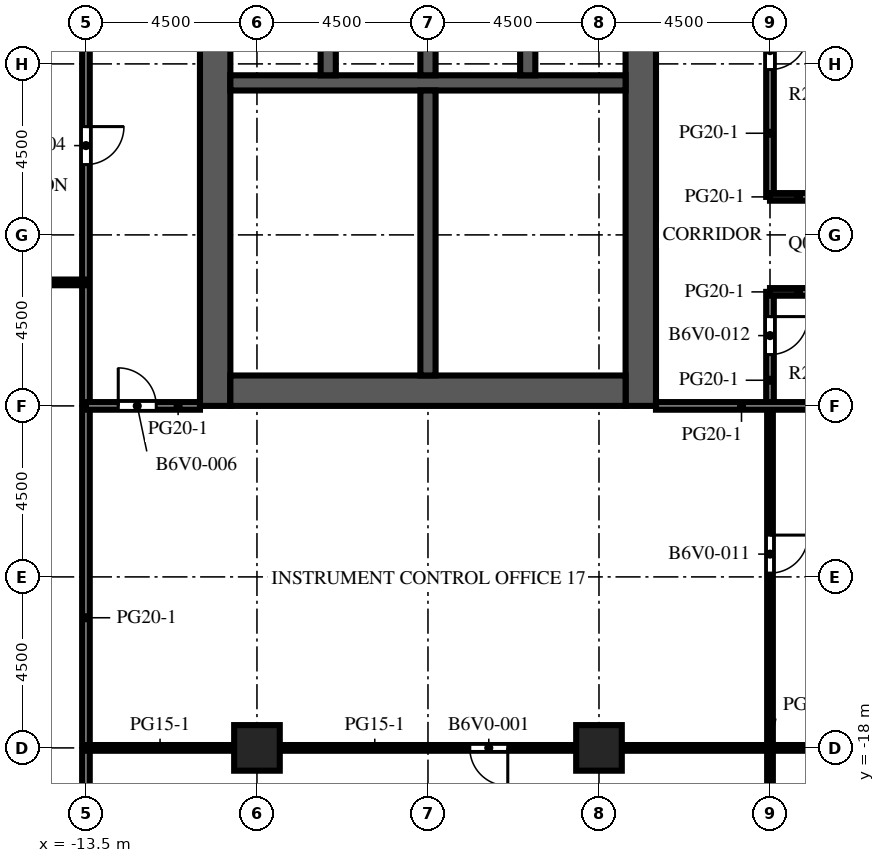
"""IFC4 building model, lengths in metres.
Left out: names, types, materials, properties, quantities, classifications, styles, units other than length and angle.
Written with IfcOpenShell. Run it as: python <this file> out.ifc"""

import sys

from ifc_helpers import new_model, si_unit, direction, frame, frame_2d, origin, origin_2d, place, context, subcontext, project, spatial, rectangle, extrude, element, fill, save


model = new_model("IFC4")
c1 = context("Model", 3, precision=1e-05, world=origin(), true_north=direction((0.0, 1.0)))
c2 = subcontext(c1, "Body", "Model", "MODEL_VIEW")
j1 = project(units=[si_unit("LENGTHUNIT", "METRE"), si_unit("PLANEANGLEUNIT", "RADIAN")], contexts=[c1])
p1 = place(None, origin())
s1 = spatial("IfcSite", under=j1, at=p1, CompositionType="ELEMENT")
p2 = place(p1, origin())
s2 = spatial("IfcBuilding", under=s1, at=p2, CompositionType="ELEMENT")
p3 = place(p2, frame((0.0, 0.0, 199.7)))
s3 = spatial("IfcBuildingStorey", under=s2, at=p3, CompositionType="ELEMENT", Elevation=199.7)
for number, where, z_axis, x_axis in (
    (1, (-9.0, -18.0, 0.0), (0.0, 0.0, 1.0), (1.0, 0.0, 0.0)),
    (2, (0.0, -18.0, 0.0), (0.0, 0.0, 1.0), (1.0, 0.0, 0.0)),
):
    element("IfcColumn", number, at=place(p3, frame(where, z_axis=z_axis, x_axis=x_axis)), inside=s3, PredefinedType="COLUMN", context=c2, shape_type="SweptSolid", body=[
        extrude(rectangle(XDim=1.2, YDim=1.2, at=origin_2d()), origin(), (0.0, 0.0, 1.0), 4.1),
    ])
p4 = place(p3, frame((-10.1, -9.0, 0.0), z_axis=(0.0, 0.0, 1.0), x_axis=(0.0, 1.0, 0.0)))
e3 = element("IfcWall", 3, at=p4, inside=s3, PredefinedType="SHEAR", context=c2, shape_type="SweptSolid", body=[
    extrude(rectangle(XDim=27.5, YDim=0.8, at=frame_2d((13.75, 0.0))), origin(), (0.0, 0.0, 1.0), 4.1),
])
p5 = place(p4, frame((12.55, 0.0, 0.0)))
e4 = element("IfcOpeningElement", 4, at=p5, cuts=e3, PredefinedType="OPENING", context=c2, shape_type="SweptSolid", body=[
    extrude(rectangle(XDim=2.4, YDim=2.4, at=frame_2d((1.2, 1.2))), frame((0.0, 0.41, 0.0), z_axis=(0.0, -1.0, 0.0), x_axis=(1.0, 0.0, 0.0)), (0.0, 0.0, 1.0), 0.82),
])
p6 = place(p4, frame((6.825, 0.0, 0.0)))
e5 = element("IfcOpeningElement", 5, at=p6, cuts=e3, PredefinedType="OPENING", context=c2, shape_type="SweptSolid", body=[
    extrude(rectangle(XDim=1.2, YDim=2.1, at=frame_2d((0.6, 1.05))), frame((0.0, 0.41, 0.0), z_axis=(0.0, -1.0, 0.0), x_axis=(1.0, 0.0, 0.0)), (0.0, 0.0, 1.0), 0.82),
])
p7 = place(p4, frame((19.475, 0.0, 0.0)))
e6 = element("IfcOpeningElement", 6, at=p7, cuts=e3, PredefinedType="OPENING", context=c2, shape_type="SweptSolid", body=[
    extrude(rectangle(XDim=1.2, YDim=2.1, at=frame_2d((0.6, 1.05))), frame((0.0, 0.41, 0.0), z_axis=(0.0, -1.0, 0.0), x_axis=(1.0, 0.0, 0.0)), (0.0, 0.0, 1.0), 0.82),
])
p8 = place(p3, frame((1.1, -9.0, 0.0), z_axis=(0.0, 0.0, 1.0), x_axis=(0.0, 1.0, 0.0)))
e7 = element("IfcWall", 7, at=p8, inside=s3, PredefinedType="SHEAR", context=c2, shape_type="SweptSolid", body=[
    extrude(rectangle(XDim=27.5, YDim=0.8, at=frame_2d((13.75, 0.0))), origin(), (0.0, 0.0, 1.0), 4.1),
])
p9 = place(p8, frame((12.55, 0.0, 0.0)))
e8 = element("IfcOpeningElement", 8, at=p9, cuts=e7, PredefinedType="OPENING", context=c2, shape_type="SweptSolid", body=[
    extrude(rectangle(XDim=2.4, YDim=2.4, at=frame_2d((1.2, 1.2))), frame((0.0, 0.41, 0.0), z_axis=(0.0, -1.0, 0.0), x_axis=(1.0, 0.0, 0.0)), (0.0, 0.0, 1.0), 0.82),
])
p10 = place(p8, frame((3.95, 0.0, 0.0)))
e9 = element("IfcOpeningElement", 9, at=p10, cuts=e7, PredefinedType="OPENING", context=c2, shape_type="SweptSolid", body=[
    extrude(rectangle(XDim=1.2, YDim=2.1, at=frame_2d((0.6, 1.05))), frame((0.0, 0.41, 0.0), z_axis=(0.0, -1.0, 0.0), x_axis=(1.0, 0.0, 0.0)), (0.0, 0.0, 1.0), 0.82),
])
p11 = place(p8, frame((19.45, 0.0, 0.0)))
e10 = element("IfcOpeningElement", 10, at=p11, cuts=e7, PredefinedType="OPENING", context=c2, shape_type="SweptSolid", body=[
    extrude(rectangle(XDim=1.0, YDim=2.1, at=frame_2d((0.5, 1.05))), frame((0.0, 0.41, 0.0), z_axis=(0.0, -1.0, 0.0), x_axis=(1.0, 0.0, 0.0)), (0.0, 0.0, 1.0), 0.82),
])
p12 = place(p8, frame((21.137, 0.0, 0.0)))
e11 = element("IfcOpeningElement", 11, at=p12, cuts=e7, PredefinedType="OPENING", context=c2, shape_type="SweptSolid", body=[
    extrude(rectangle(XDim=1.0, YDim=2.1, at=frame_2d((0.5, 1.05))), frame((0.0, 0.41, 0.0), z_axis=(0.0, -1.0, 0.0), x_axis=(1.0, 0.0, 0.0)), (0.0, 0.0, 1.0), 0.82),
])
p13 = place(p8, frame((23.2, 0.0, 0.0)))
e12 = element("IfcOpeningElement", 12, at=p13, cuts=e7, PredefinedType="OPENING", context=c2, shape_type="SweptSolid", body=[
    extrude(rectangle(XDim=1.0, YDim=2.1, at=frame_2d((0.5, 1.05))), frame((0.0, 0.41, 0.0), z_axis=(0.0, -1.0, 0.0), x_axis=(1.0, 0.0, 0.0)), (0.0, 0.0, 1.0), 0.82),
])
p14 = place(p8, frame((25.262, 0.0, 0.0)))
e13 = element("IfcOpeningElement", 13, at=p14, cuts=e7, PredefinedType="OPENING", context=c2, shape_type="SweptSolid", body=[
    extrude(rectangle(XDim=1.0, YDim=2.1, at=frame_2d((0.5, 1.05))), frame((0.0, 0.41, 0.0), z_axis=(0.0, -1.0, 0.0), x_axis=(1.0, 0.0, 0.0)), (0.0, 0.0, 1.0), 0.82),
])
p15 = place(p3, frame((-9.7, -8.6, 0.0), z_axis=(0.0, 0.0, 1.0), x_axis=(1.0, 0.0, 0.0)))
e14 = element("IfcWall", 14, at=p15, inside=s3, PredefinedType="SHEAR", context=c2, shape_type="SweptSolid", body=[
    extrude(rectangle(XDim=10.4, YDim=0.8, at=frame_2d((5.2, 0.0))), origin(), (0.0, 0.0, 1.0), 4.1),
])
p16 = place(p3, frame((-9.7, -0.5, 0.0), z_axis=(0.0, 0.0, 1.0), x_axis=(1.0, 0.0, 0.0)))
e15 = element("IfcWall", 15, at=p16, inside=s3, PredefinedType="SHEAR", context=c2, shape_type="SweptSolid", body=[
    extrude(rectangle(XDim=10.4, YDim=0.4, at=frame_2d((5.2, 0.0))), origin(), (0.0, 0.0, 1.0), 4.1),
])
for number, where, z_axis, x_axis in (
    (16, (-7.125, -0.3, 0.0), (0.0, 0.0, 1.0), (0.0, 1.0, 0.0)),
    (17, (-4.5, -0.3, 0.0), (0.0, 0.0, 1.0), (0.0, 1.0, 0.0)),
    (18, (-1.875, -0.3, 0.0), (0.0, 0.0, 1.0), (0.0, 1.0, 0.0)),
):
    element("IfcWall", number, at=place(p3, frame(where, z_axis=z_axis, x_axis=x_axis)), inside=s3, PredefinedType="SHEAR", context=c2, shape_type="SweptSolid", body=[
        extrude(rectangle(XDim=2.9, YDim=0.4, at=frame_2d((1.45, 0.0))), origin(), (0.0, 0.0, 1.0), 4.1),
    ])
p17 = place(p3, frame((-4.5, -8.2, 0.0), z_axis=(0.0, 0.0, 1.0), x_axis=(0.0, 1.0, 0.0)))
e19 = element("IfcWall", 19, at=p17, inside=s3, PredefinedType="SHEAR", context=c2, shape_type="SweptSolid", body=[
    extrude(rectangle(XDim=7.5, YDim=0.4, at=frame_2d((3.75, 0.0))), origin(), (0.0, 0.0, 1.0), 4.1),
])
p18 = place(p3, frame((-0.9, -5.95, 0.0), z_axis=(0.0, 0.0, 1.0), x_axis=(1.0, 0.0, 0.0)))
e20 = element("IfcWall", 20, at=p18, inside=s3, PredefinedType="PARTITIONING", context=c2, shape_type="SweptSolid", body=[
    extrude(rectangle(XDim=1.6, YDim=0.1, at=frame_2d((0.8, 0.0))), origin(), (0.0, 0.0, 1.0), 3.65),
])
p19 = place(p18, frame((0.3, 0.0, 0.0)))
e21 = element("IfcOpeningElement", 21, at=p19, cuts=e20, PredefinedType="OPENING", context=c2, shape_type="SweptSolid", body=[
    extrude(rectangle(XDim=1.0, YDim=2.1, at=frame_2d((0.5, 1.05))), frame((0.0, 0.06, 0.0), z_axis=(0.0, -1.0, 0.0), x_axis=(1.0, 0.0, 0.0)), (0.0, 0.0, 1.0), 0.12),
])
p20 = place(p3, frame((-0.9, -2.95, 0.0), z_axis=(0.0, 0.0, 1.0), x_axis=(1.0, 0.0, 0.0)))
e22 = element("IfcWall", 22, at=p20, inside=s3, PredefinedType="PARTITIONING", context=c2, shape_type="SweptSolid", body=[
    extrude(rectangle(XDim=1.6, YDim=0.1, at=frame_2d((0.8, 0.0))), origin(), (0.0, 0.0, 1.0), 3.65),
])
p21 = place(p20, frame((0.3, 0.0, 0.0)))
e23 = element("IfcOpeningElement", 23, at=p21, cuts=e22, PredefinedType="OPENING", context=c2, shape_type="SweptSolid", body=[
    extrude(rectangle(XDim=1.0, YDim=2.1, at=frame_2d((0.5, 1.05))), frame((0.0, 0.06, 0.0), z_axis=(0.0, -1.0, 0.0), x_axis=(1.0, 0.0, 0.0)), (0.0, 0.0, 1.0), 0.12),
])
p22 = place(p3, frame((-0.9, -5.95, 0.0), z_axis=(0.0, 0.0, 1.0), x_axis=(0.0, 1.0, 0.0)))
e24 = element("IfcWall", 24, at=p22, inside=s3, PredefinedType="PARTITIONING", context=c2, shape_type="SweptSolid", body=[
    extrude(rectangle(XDim=3.0, YDim=0.1, at=frame_2d((1.5, 0.0))), origin(), (0.0, 0.0, 1.0), 3.65),
])
p23 = place(p22, frame((1.0, 0.0, 0.0)))
e25 = element("IfcOpeningElement", 25, at=p23, cuts=e24, PredefinedType="OPENING", context=c2, shape_type="SweptSolid", body=[
    extrude(rectangle(XDim=1.0, YDim=2.1, at=frame_2d((0.5, 1.05))), frame((0.0, 0.06, 0.0), z_axis=(0.0, -1.0, 0.0), x_axis=(1.0, 0.0, 0.0)), (0.0, 0.0, 1.0), 0.12),
])
for number, where, z_axis, x_axis in (
    (26, (-4.3, -5.95, 0.0), (0.0, 0.0, 1.0), (1.0, 0.0, 0.0)),
    (27, (-4.3, -2.95, 0.0), (0.0, 0.0, 1.0), (1.0, 0.0, 0.0)),
):
    element("IfcWall", number, at=place(p3, frame(where, z_axis=z_axis, x_axis=x_axis)), inside=s3, PredefinedType="PARTITIONING", context=c2, shape_type="SweptSolid", body=[
        extrude(rectangle(XDim=3.4, YDim=0.1, at=frame_2d((1.7, 0.0))), origin(), (0.0, 0.0, 1.0), 3.65),
    ])
p24 = place(p3, frame((-13.5, -26.5, 0.0), z_axis=(0.0, 0.0, 1.0), x_axis=(0.0, 1.0, 0.0)))
e28 = element("IfcWall", 28, at=p24, inside=s3, PredefinedType="PARTITIONING", context=c2, shape_type="SweptSolid", body=[
    extrude(rectangle(XDim=29.75, YDim=0.2, at=frame_2d((14.875, 0.0))), origin(), (0.0, 0.0, 1.0), 3.65),
])
p25 = place(p24, frame((23.85, 0.0, 0.0)))
e29 = element("IfcOpeningElement", 29, at=p25, cuts=e28, PredefinedType="OPENING", context=c2, shape_type="SweptSolid", body=[
    extrude(rectangle(XDim=1.0, YDim=2.1, at=frame_2d((0.5, 1.05))), frame((0.0, 0.11, 0.0), z_axis=(0.0, -1.0, 0.0), x_axis=(1.0, 0.0, 0.0)), (0.0, 0.0, 1.0), 0.22),
])
p26 = place(p3, frame((4.5, -9.0, 0.0), z_axis=(0.0, 0.0, 1.0), x_axis=(0.0, -1.0, 0.0)))
e30 = element("IfcWall", 30, at=p26, inside=s3, PredefinedType="PARTITIONING", context=c2, shape_type="SweptSolid", body=[
    extrude(rectangle(XDim=17.5, YDim=0.15, at=frame_2d((8.75, 0.0))), origin(), (0.0, 0.0, 1.0), 3.65),
])
p27 = place(p26, frame((3.4, 0.0, 0.0)))
e31 = element("IfcOpeningElement", 31, at=p27, cuts=e30, PredefinedType="OPENING", context=c2, shape_type="SweptSolid", body=[
    extrude(rectangle(XDim=1.0, YDim=2.1, at=frame_2d((0.5, 1.05))), frame((0.0, 0.085, 0.0), z_axis=(0.0, -1.0, 0.0), x_axis=(1.0, 0.0, 0.0)), (0.0, 0.0, 1.0), 0.17),
])
p28 = place(p3, frame((4.5, -6.0, 0.0), z_axis=(0.0, 0.0, 1.0), x_axis=(0.0, -1.0, 0.0)))
e32 = element("IfcWall", 32, at=p28, inside=s3, PredefinedType="PARTITIONING", context=c2, shape_type="SweptSolid", body=[
    extrude(rectangle(XDim=3.0, YDim=0.2, at=frame_2d((1.5, 0.0))), origin(), (0.0, 0.0, 1.0), 3.65),
])
p29 = place(p28, frame((0.65, 0.0, 0.0)))
e33 = element("IfcOpeningElement", 33, at=p29, cuts=e32, PredefinedType="OPENING", context=c2, shape_type="SweptSolid", body=[
    extrude(rectangle(XDim=1.0, YDim=2.1, at=frame_2d((0.5, 1.05))), frame((0.0, 0.11, 0.0), z_axis=(0.0, -1.0, 0.0), x_axis=(1.0, 0.0, 0.0)), (0.0, 0.0, 1.0), 0.22),
])
p30 = place(p3, frame((4.5, 2.8, 0.0), z_axis=(0.0, 0.0, 1.0), x_axis=(0.0, -1.0, 0.0)))
e34 = element("IfcWall", 34, at=p30, inside=s3, PredefinedType="PARTITIONING", context=c2, shape_type="SweptSolid", body=[
    extrude(rectangle(XDim=6.3, YDim=0.2, at=frame_2d((3.15, 0.0))), origin(), (0.0, 0.0, 1.0), 3.65),
])
p31 = place(p30, frame((1.95, 0.0, 0.0)))
e35 = element("IfcOpeningElement", 35, at=p31, cuts=e34, PredefinedType="OPENING", context=c2, shape_type="SweptSolid", body=[
    extrude(rectangle(XDim=1.0, YDim=2.1, at=frame_2d((0.5, 1.05))), frame((0.0, 0.11, 0.0), z_axis=(0.0, -1.0, 0.0), x_axis=(1.0, 0.0, 0.0)), (0.0, 0.0, 1.0), 0.22),
])
p32 = place(p3, frame((-13.5, -18.0, 0.0), z_axis=(0.0, 0.0, 1.0), x_axis=(1.0, 0.0, 0.0)))
e36 = element("IfcWall", 36, at=p32, inside=s3, PredefinedType="PARTITIONING", context=c2, shape_type="SweptSolid", body=[
    extrude(rectangle(XDim=3.9, YDim=0.15, at=frame_2d((1.95, 0.0))), origin(), (0.0, 0.0, 1.0), 3.65),
])
p33 = place(p3, frame((-0.6, -18.0, 0.0), z_axis=(0.0, 0.0, 1.0), x_axis=(-1.0, 0.0, 0.0)))
e37 = element("IfcWall", 37, at=p33, inside=s3, PredefinedType="PARTITIONING", context=c2, shape_type="SweptSolid", body=[
    extrude(rectangle(XDim=7.8, YDim=0.15, at=frame_2d((3.9, 0.0))), origin(), (0.0, 0.0, 1.0), 3.65),
])
p34 = place(p33, frame((1.8, 0.0, 0.0)))
e38 = element("IfcOpeningElement", 38, at=p34, cuts=e37, PredefinedType="OPENING", context=c2, shape_type="SweptSolid", body=[
    extrude(rectangle(XDim=1.0, YDim=2.1, at=frame_2d((0.5, 1.05))), frame((0.0, 0.085, 0.0), z_axis=(0.0, -1.0, 0.0), x_axis=(1.0, 0.0, 0.0)), (0.0, 0.0, 1.0), 0.17),
])
p35 = place(p3, frame((0.6, -18.0, 0.0), z_axis=(0.0, 0.0, 1.0), x_axis=(1.0, 0.0, 0.0)))
e39 = element("IfcWall", 39, at=p35, inside=s3, PredefinedType="PARTITIONING", context=c2, shape_type="SweptSolid", body=[
    extrude(rectangle(XDim=7.8, YDim=0.15, at=frame_2d((3.9, 0.0))), origin(), (0.0, 0.0, 1.0), 3.65),
])
p36 = place(p3, frame((-10.5, -9.0, 0.0), z_axis=(0.0, 0.0, 1.0), x_axis=(-1.0, 0.0, 0.0)))
e40 = element("IfcWall", 40, at=p36, inside=s3, PredefinedType="PARTITIONING", context=c2, shape_type="SweptSolid", body=[
    extrude(rectangle(XDim=3.0, YDim=0.2, at=frame_2d((1.5, 0.0))), origin(), (0.0, 0.0, 1.0), 3.65),
])
p37 = place(p36, frame((1.15, 0.0, 0.0)))
e41 = element("IfcOpeningElement", 41, at=p37, cuts=e40, PredefinedType="OPENING", context=c2, shape_type="SweptSolid", body=[
    extrude(rectangle(XDim=1.0, YDim=2.1, at=frame_2d((0.5, 1.05))), frame((0.0, 0.11, 0.0), z_axis=(0.0, -1.0, 0.0), x_axis=(1.0, 0.0, 0.0)), (0.0, 0.0, 1.0), 0.22),
])
p38 = place(p3, frame((1.5, -9.0, 0.0), z_axis=(0.0, 0.0, 1.0), x_axis=(1.0, 0.0, 0.0)))
e42 = element("IfcWall", 42, at=p38, inside=s3, PredefinedType="PARTITIONING", context=c2, shape_type="SweptSolid", body=[
    extrude(rectangle(XDim=4.5, YDim=0.2, at=frame_2d((2.25, 0.0))), origin(), (0.0, 0.0, 1.0), 3.65),
])
p39 = place(p3, frame((4.5, -6.0, 0.0), z_axis=(0.0, 0.0, 1.0), x_axis=(1.0, 0.0, 0.0)))
e43 = element("IfcWall", 43, at=p39, inside=s3, PredefinedType="PARTITIONING", context=c2, shape_type="SweptSolid", body=[
    extrude(rectangle(XDim=1.5, YDim=0.2, at=frame_2d((0.75, 0.0))), origin(), (0.0, 0.0, 1.0), 3.65),
])
p40 = place(p3, frame((-13.5, -5.75, 0.0), z_axis=(0.0, 0.0, 1.0), x_axis=(-1.0, 0.0, 0.0)))
e44 = element("IfcWall", 44, at=p40, inside=s3, PredefinedType="PARTITIONING", context=c2, shape_type="SweptSolid", body=[
    extrude(rectangle(XDim=8.85, YDim=0.15, at=frame_2d((4.425, 0.0))), origin(), (0.0, 0.0, 1.0), 3.65),
])
p41 = place(p40, frame((4.65, 0.0, 0.0)))
e45 = element("IfcOpeningElement", 45, at=p41, cuts=e44, PredefinedType="OPENING", context=c2, shape_type="SweptSolid", body=[
    extrude(rectangle(XDim=1.0, YDim=2.1, at=frame_2d((0.5, 1.05))), frame((0.0, 0.085, 0.0), z_axis=(0.0, -1.0, 0.0), x_axis=(1.0, 0.0, 0.0)), (0.0, 0.0, 1.0), 0.17),
])
p42 = place(p3, frame((4.5, -3.5, 0.0), z_axis=(0.0, 0.0, 1.0), x_axis=(1.0, 0.0, 0.0)))
e46 = element("IfcWall", 46, at=p42, inside=s3, PredefinedType="PARTITIONING", context=c2, shape_type="SweptSolid", body=[
    extrude(rectangle(XDim=1.5, YDim=0.2, at=frame_2d((0.75, 0.0))), origin(), (0.0, 0.0, 1.0), 3.65),
])
p43 = place(p6, origin())
e47 = element("IfcDoor", 47, at=p43, inside=s3, OperationType="SINGLE_SWING_LEFT", PredefinedType="DOOR", context=c2, shape_type="SweptSolid", body=[
    extrude(rectangle(XDim=1.2, YDim=2.1, at=frame_2d((0.6, 1.05))), frame((0.0, 0.025, 0.0), z_axis=(0.0, -1.0, 0.0), x_axis=(1.0, 0.0, 0.0)), (0.0, 0.0, 1.0), 0.05),
])
fill(e5, e47)
p44 = place(p10, origin())
e48 = element("IfcDoor", 48, at=p44, inside=s3, OperationType="SINGLE_SWING_LEFT", PredefinedType="DOOR", context=c2, shape_type="SweptSolid", body=[
    extrude(rectangle(XDim=1.2, YDim=2.1, at=frame_2d((0.6, 1.05))), frame((0.0, 0.375, 0.0), z_axis=(0.0, -1.0, 0.0), x_axis=(1.0, 0.0, 0.0)), (0.0, 0.0, 1.0), 0.05),
])
fill(e9, e48)
p45 = place(p19, origin())
e49 = element("IfcDoor", 49, at=p45, inside=s3, OperationType="SINGLE_SWING_RIGHT", PredefinedType="DOOR", context=c2, shape_type="SweptSolid", body=[
    extrude(rectangle(XDim=1.0, YDim=2.1, at=frame_2d((0.5, 1.05))), frame((0.0, 0.025, 0.0), z_axis=(0.0, -1.0, 0.0), x_axis=(1.0, 0.0, 0.0)), (0.0, 0.0, 1.0), 0.05),
])
fill(e21, e49)
p46 = place(p21, origin())
e50 = element("IfcDoor", 50, at=p46, inside=s3, OperationType="SINGLE_SWING_LEFT", PredefinedType="DOOR", context=c2, shape_type="SweptSolid", body=[
    extrude(rectangle(XDim=1.0, YDim=2.1, at=frame_2d((0.5, 1.05))), frame((0.0, 0.025, 0.0), z_axis=(0.0, -1.0, 0.0), x_axis=(1.0, 0.0, 0.0)), (0.0, 0.0, 1.0), 0.05),
])
fill(e23, e50)
p47 = place(p23, origin())
e51 = element("IfcDoor", 51, at=p47, inside=s3, OperationType="SINGLE_SWING_RIGHT", PredefinedType="DOOR", context=c2, shape_type="SweptSolid", body=[
    extrude(rectangle(XDim=1.0, YDim=2.1, at=frame_2d((0.5, 1.05))), frame((0.0, 0.025, 0.0), z_axis=(0.0, -1.0, 0.0), x_axis=(1.0, 0.0, 0.0)), (0.0, 0.0, 1.0), 0.05),
])
fill(e25, e51)
p48 = place(p34, origin())
e52 = element("IfcDoor", 52, at=p48, inside=s3, OperationType="SINGLE_SWING_LEFT", PredefinedType="DOOR", context=c2, shape_type="SweptSolid", body=[
    extrude(rectangle(XDim=1.0, YDim=2.1, at=frame_2d((0.5, 1.05))), frame((0.0, 0.025, 0.0), z_axis=(0.0, -1.0, 0.0), x_axis=(1.0, 0.0, 0.0)), (0.0, 0.0, 1.0), 0.05),
])
fill(e38, e52)
p49 = place(p25, origin())
e53 = element("IfcDoor", 53, at=p49, inside=s3, OperationType="SINGLE_SWING_RIGHT", PredefinedType="DOOR", context=c2, shape_type="SweptSolid", body=[
    extrude(rectangle(XDim=1.0, YDim=2.1, at=frame_2d((0.5, 1.05))), frame((0.0, 0.025, 0.0), z_axis=(0.0, -1.0, 0.0), x_axis=(1.0, 0.0, 0.0)), (0.0, 0.0, 1.0), 0.05),
])
fill(e29, e53)
p50 = place(p37, origin())
e54 = element("IfcDoor", 54, at=p50, inside=s3, OperationType="SINGLE_SWING_RIGHT", PredefinedType="DOOR", context=c2, shape_type="SweptSolid", body=[
    extrude(rectangle(XDim=1.0, YDim=2.1, at=frame_2d((0.5, 1.05))), frame((0.0, 0.025, 0.0), z_axis=(0.0, -1.0, 0.0), x_axis=(1.0, 0.0, 0.0)), (0.0, 0.0, 1.0), 0.05),
])
fill(e41, e54)
p51 = place(p27, origin())
e55 = element("IfcDoor", 55, at=p51, inside=s3, OperationType="SINGLE_SWING_LEFT", PredefinedType="DOOR", context=c2, shape_type="SweptSolid", body=[
    extrude(rectangle(XDim=1.0, YDim=2.1, at=frame_2d((0.5, 1.05))), frame((0.0, 0.025, 0.0), z_axis=(0.0, -1.0, 0.0), x_axis=(1.0, 0.0, 0.0)), (0.0, 0.0, 1.0), 0.05),
])
fill(e31, e55)
p52 = place(p29, origin())
e56 = element("IfcDoor", 56, at=p52, inside=s3, OperationType="SINGLE_SWING_LEFT", PredefinedType="DOOR", context=c2, shape_type="SweptSolid", body=[
    extrude(rectangle(XDim=1.0, YDim=2.1, at=frame_2d((0.5, 1.05))), frame((0.0, 0.025, 0.0), z_axis=(0.0, -1.0, 0.0), x_axis=(1.0, 0.0, 0.0)), (0.0, 0.0, 1.0), 0.05),
])
fill(e33, e56)
p53 = place(p31, origin())
e57 = element("IfcDoor", 57, at=p53, inside=s3, OperationType="SINGLE_SWING_LEFT", PredefinedType="DOOR", context=c2, shape_type="SweptSolid", body=[
    extrude(rectangle(XDim=1.0, YDim=2.1, at=frame_2d((0.5, 1.05))), frame((0.0, 0.025, 0.0), z_axis=(0.0, -1.0, 0.0), x_axis=(1.0, 0.0, 0.0)), (0.0, 0.0, 1.0), 0.05),
])
fill(e35, e57)
save(model, sys.argv[1])
